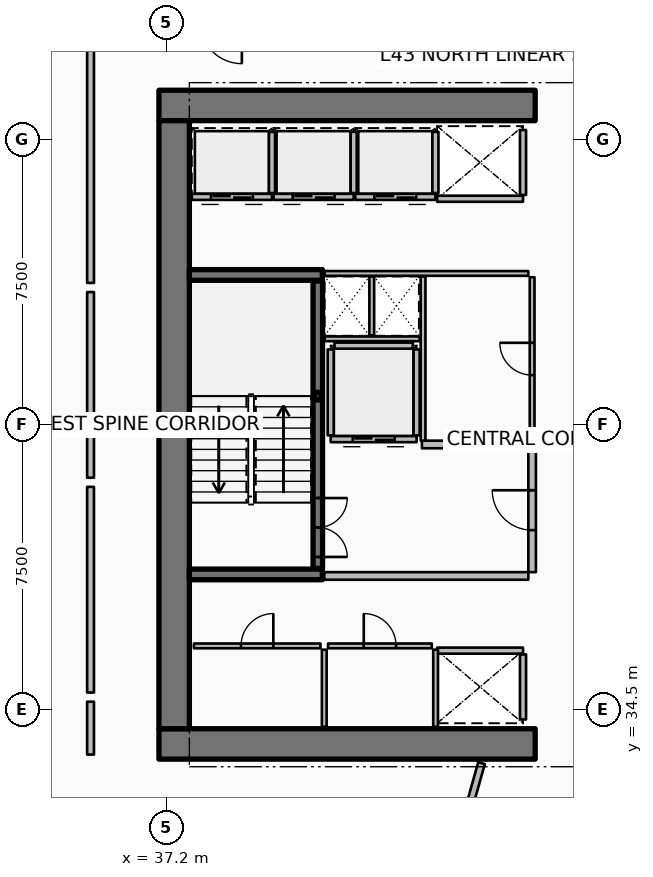
"""IFC4 building model, lengths in metres.
Left out: names, types, materials, properties, quantities, classifications, styles, units other than length and angle.
Written with IfcOpenShell. Run it as: python <this file> out.ifc"""

import sys

from ifc_helpers import new_model, si_unit, direction, frame, frame_2d, origin, origin_2d, place, context, subcontext, project, spatial, rectangle, hollow_rectangle, extrude, element, fill, save


model = new_model("IFC4")
c1 = context("Model", 3, precision=1e-05, world=origin(), true_north=direction((0.0, 1.0)))
c2 = subcontext(c1, "Body", "Model", "MODEL_VIEW")
j1 = project(units=[si_unit("LENGTHUNIT", "METRE"), si_unit("PLANEANGLEUNIT", "RADIAN")], contexts=[c1])
p1 = place(None, origin())
s1 = spatial("IfcSite", under=j1, at=p1, CompositionType="ELEMENT")
p2 = place(p1, origin())
s2 = spatial("IfcBuilding", under=s1, at=p2, CompositionType="ELEMENT")
p3 = place(p2, frame((0.0, 0.0, 172.8)))
s3 = spatial("IfcBuildingStorey", under=s2, at=p3, CompositionType="ELEMENT", Elevation=172.8)
for number, where, z_axis, x_axis in (
    (1, (37.0, 33.6, 0.0), (0.0, 0.0, 1.0), (1.0, 0.0, 0.0)),
    (2, (37.0, 50.4, 0.0), (0.0, 0.0, 1.0), (1.0, 0.0, 0.0)),
):
    element("IfcWall", number, at=place(p3, frame(where, z_axis=z_axis, x_axis=x_axis)), inside=s3, PredefinedType="SHEAR", context=c2, shape_type="SweptSolid", body=[
        extrude(rectangle(XDim=9.9, YDim=0.8, at=frame_2d((4.95, 0.0))), origin(), (0.0, 0.0, 1.0), 3.75),
    ])
p4 = place(p3, frame((37.4, 34.0, 0.0), z_axis=(0.0, 0.0, 1.0), x_axis=(0.0, 1.0, 0.0)))
e3 = element("IfcWall", 3, at=p4, inside=s3, PredefinedType="SHEAR", context=c2, shape_type="SweptSolid", body=[
    extrude(rectangle(XDim=16.0, YDim=0.8, at=frame_2d((8.0, 0.0))), origin(), (0.0, 0.0, 1.0), 3.75),
])
for number, where, z_axis, x_axis in (
    (4, (37.8, 38.06, 0.0), (0.0, 0.0, 1.0), (1.0, 0.0, 0.0)),
    (5, (37.8, 45.94, 0.0), (0.0, 0.0, 1.0), (1.0, 0.0, 0.0)),
):
    element("IfcWall", number, at=place(p3, frame(where, z_axis=z_axis, x_axis=x_axis)), inside=s3, PredefinedType="SHEAR", context=c2, shape_type="SweptSolid", body=[
        extrude(rectangle(XDim=3.5, YDim=0.28, at=frame_2d((1.75, 0.0))), origin(), (0.0, 0.0, 1.0), 3.75),
    ])
p5 = place(p3, frame((41.18, 42.75, 0.0), z_axis=(0.0, 0.0, 1.0), x_axis=(1.0, 0.0, 0.0)))
e6 = element("IfcColumn", 6, at=p5, inside=s3, PredefinedType="COLUMN", context=c2, shape_type="SweptSolid", body=[
    extrude(hollow_rectangle(XDim=0.2, YDim=0.2, WallThickness=0.01, InnerFilletRadius=0.01, OuterFilletRadius=0.02, at=origin_2d()), origin(), (0.0, 0.0, 1.0), 1.67),
])
p6 = place(p3, frame((41.18, 38.22, 0.0), z_axis=(0.0, 0.0, 1.0), x_axis=(0.0, 1.0, 0.0)))
e7 = element("IfcWall", 7, at=p6, inside=s3, PredefinedType="SOLIDWALL", context=c2, shape_type="SweptSolid", body=[
    extrude(rectangle(XDim=7.56, YDim=0.25, at=frame_2d((3.78, 0.0))), origin(), (0.0, 0.0, 1.0), 3.35),
])
p7 = place(p6, frame((0.3, 0.0, 0.0)))
e8 = element("IfcOpeningElement", 8, at=p7, cuts=e7, PredefinedType="OPENING", context=c2, shape_type="SweptSolid", body=[
    extrude(rectangle(XDim=1.55, YDim=2.15, at=frame_2d((0.775, 1.075))), frame((0.0, 0.135, 0.0), z_axis=(0.0, -1.0, 0.0), x_axis=(1.0, 0.0, 0.0)), (0.0, 0.0, 1.0), 0.27),
])
p8 = place(p3, frame((39.975, 47.995, 0.0), z_axis=(0.0, 0.0, 1.0), x_axis=(-1.0, 0.0, 0.0)))
e9 = element("IfcWall", 9, at=p8, inside=s3, PredefinedType="PARTITIONING", context=c2, shape_type="SweptSolid", body=[
    extrude(rectangle(XDim=2.11, YDim=0.16, at=frame_2d((1.055, 0.0))), origin(), (0.0, 0.0, 1.0), 3.35),
])
p9 = place(p8, frame((0.505, 0.0, 0.0)))
e10 = element("IfcOpeningElement", 10, at=p9, cuts=e9, PredefinedType="OPENING", context=c2, shape_type="SweptSolid", body=[
    extrude(rectangle(XDim=1.1, YDim=2.1, at=frame_2d((0.55, 1.05))), frame((0.0, 0.09, 0.0), z_axis=(0.0, -1.0, 0.0), x_axis=(1.0, 0.0, 0.0)), (0.0, 0.0, 1.0), 0.18),
])
p10 = place(p3, frame((39.975, 48.095, 0.0), z_axis=(0.0, 0.0, 1.0), x_axis=(0.0, 1.0, 0.0)))
e11 = element("IfcWall", 11, at=p10, inside=s3, PredefinedType="PARTITIONING", context=c2, shape_type="SweptSolid", body=[
    extrude(rectangle(XDim=1.61, YDim=0.16, at=frame_2d((0.805, 0.0))), origin(), (0.0, 0.0, 1.0), 3.35),
])
p11 = place(p3, frame((42.125, 47.995, 0.0), z_axis=(0.0, 0.0, 1.0), x_axis=(-1.0, 0.0, 0.0)))
e12 = element("IfcWall", 12, at=p11, inside=s3, PredefinedType="PARTITIONING", context=c2, shape_type="SweptSolid", body=[
    extrude(rectangle(XDim=2.11, YDim=0.16, at=frame_2d((1.055, 0.0))), origin(), (0.0, 0.0, 1.0), 3.35),
])
p12 = place(p11, frame((0.505, 0.0, 0.0)))
e13 = element("IfcOpeningElement", 13, at=p12, cuts=e12, PredefinedType="OPENING", context=c2, shape_type="SweptSolid", body=[
    extrude(rectangle(XDim=1.1, YDim=2.1, at=frame_2d((0.55, 1.05))), frame((0.0, 0.09, 0.0), z_axis=(0.0, -1.0, 0.0), x_axis=(1.0, 0.0, 0.0)), (0.0, 0.0, 1.0), 0.18),
])
p13 = place(p3, frame((42.125, 48.095, 0.0), z_axis=(0.0, 0.0, 1.0), x_axis=(0.0, 1.0, 0.0)))
e14 = element("IfcWall", 14, at=p13, inside=s3, PredefinedType="PARTITIONING", context=c2, shape_type="SweptSolid", body=[
    extrude(rectangle(XDim=1.61, YDim=0.16, at=frame_2d((0.805, 0.0))), origin(), (0.0, 0.0, 1.0), 3.35),
])
p14 = place(p3, frame((44.275, 47.995, 0.0), z_axis=(0.0, 0.0, 1.0), x_axis=(-1.0, 0.0, 0.0)))
e15 = element("IfcWall", 15, at=p14, inside=s3, PredefinedType="PARTITIONING", context=c2, shape_type="SweptSolid", body=[
    extrude(rectangle(XDim=2.11, YDim=0.16, at=frame_2d((1.055, 0.0))), origin(), (0.0, 0.0, 1.0), 3.35),
])
p15 = place(p14, frame((0.505, 0.0, 0.0)))
e16 = element("IfcOpeningElement", 16, at=p15, cuts=e15, PredefinedType="OPENING", context=c2, shape_type="SweptSolid", body=[
    extrude(rectangle(XDim=1.1, YDim=2.1, at=frame_2d((0.55, 1.05))), frame((0.0, 0.09, 0.0), z_axis=(0.0, -1.0, 0.0), x_axis=(1.0, 0.0, 0.0)), (0.0, 0.0, 1.0), 0.18),
])
p16 = place(p3, frame((44.275, 48.095, 0.0), z_axis=(0.0, 0.0, 1.0), x_axis=(0.0, 1.0, 0.0)))
e17 = element("IfcWall", 17, at=p16, inside=s3, PredefinedType="PARTITIONING", context=c2, shape_type="SweptSolid", body=[
    extrude(rectangle(XDim=1.61, YDim=0.16, at=frame_2d((0.805, 0.0))), origin(), (0.0, 0.0, 1.0), 3.35),
])
p17 = place(p3, frame((46.58, 47.945, 0.0), z_axis=(0.0, 0.0, 1.0), x_axis=(-1.0, 0.0, 0.0)))
e18 = element("IfcWall", 18, at=p17, inside=s3, PredefinedType="PARTITIONING", context=c2, shape_type="SweptSolid", body=[
    extrude(rectangle(XDim=2.26, YDim=0.16, at=frame_2d((1.13, 0.0))), origin(), (0.0, 0.0, 1.0), 3.35),
])
p18 = place(p3, frame((46.58, 48.045, 0.0), z_axis=(0.0, 0.0, 1.0), x_axis=(0.0, 1.0, 0.0)))
e19 = element("IfcWall", 19, at=p18, inside=s3, PredefinedType="PARTITIONING", context=c2, shape_type="SweptSolid", body=[
    extrude(rectangle(XDim=1.71, YDim=0.16, at=frame_2d((0.855, 0.0))), origin(), (0.0, 0.0, 1.0), 3.35),
])
p19 = place(p3, frame((44.32, 36.055, 0.0), z_axis=(0.0, 0.0, 1.0), x_axis=(1.0, 0.0, 0.0)))
e20 = element("IfcWall", 20, at=p19, inside=s3, PredefinedType="PARTITIONING", context=c2, shape_type="SweptSolid", body=[
    extrude(rectangle(XDim=2.26, YDim=0.16, at=frame_2d((1.13, 0.0))), origin(), (0.0, 0.0, 1.0), 3.35),
])
p20 = place(p3, frame((46.58, 34.245, 0.0), z_axis=(0.0, 0.0, 1.0), x_axis=(0.0, 1.0, 0.0)))
e21 = element("IfcWall", 21, at=p20, inside=s3, PredefinedType="PARTITIONING", context=c2, shape_type="SweptSolid", body=[
    extrude(rectangle(XDim=1.71, YDim=0.16, at=frame_2d((0.855, 0.0))), origin(), (0.0, 0.0, 1.0), 3.35),
])
p21 = place(p3, frame((43.78, 41.62, 0.0), z_axis=(0.0, 0.0, 1.0), x_axis=(-1.0, 0.0, 0.0)))
e22 = element("IfcWall", 22, at=p21, inside=s3, PredefinedType="PARTITIONING", context=c2, shape_type="SweptSolid", body=[
    extrude(rectangle(XDim=2.26, YDim=0.16, at=frame_2d((1.13, 0.0))), origin(), (0.0, 0.0, 1.0), 3.35),
])
p22 = place(p21, frame((0.58, 0.0, 0.0)))
e23 = element("IfcOpeningElement", 23, at=p22, cuts=e22, PredefinedType="OPENING", context=c2, shape_type="SweptSolid", body=[
    extrude(rectangle(XDim=1.1, YDim=2.1, at=frame_2d((0.55, 1.05))), frame((0.0, 0.09, 0.0), z_axis=(0.0, -1.0, 0.0), x_axis=(1.0, 0.0, 0.0)), (0.0, 0.0, 1.0), 0.18),
])
for number, where, z_axis, x_axis in (
    (24, (43.78, 41.72, 0.0), (0.0, 0.0, 1.0), (0.0, 1.0, 0.0)),
    (25, (41.52, 41.72, 0.0), (0.0, 0.0, 1.0), (0.0, 1.0, 0.0)),
):
    element("IfcWall", number, at=place(p3, frame(where, z_axis=z_axis, x_axis=x_axis)), inside=s3, PredefinedType="PARTITIONING", context=c2, shape_type="SweptSolid", body=[
        extrude(rectangle(XDim=2.26, YDim=0.16, at=frame_2d((1.13, 0.0))), origin(), (0.0, 0.0, 1.0), 3.35),
    ])
p23 = place(p3, frame((41.62, 44.08, 0.0), z_axis=(0.0, 0.0, 1.0), x_axis=(1.0, 0.0, 0.0)))
e26 = element("IfcWall", 26, at=p23, inside=s3, PredefinedType="PARTITIONING", context=c2, shape_type="SweptSolid", body=[
    extrude(rectangle(XDim=2.06, YDim=0.16, at=frame_2d((1.03, 0.0))), origin(), (0.0, 0.0, 1.0), 3.35),
])
for number, where, z_axis, x_axis in (
    (27, (44.28, 34.05, 0.0), (0.0, 0.0, 1.0), (0.0, 1.0, 0.0)),
    (28, (41.35, 34.05, 0.0), (0.0, 0.0, 1.0), (0.0, 1.0, 0.0)),
):
    element("IfcWall", number, at=place(p3, frame(where, z_axis=z_axis, x_axis=x_axis)), inside=s3, PredefinedType="PARTITIONING", context=c2, shape_type="SweptSolid", body=[
        extrude(rectangle(XDim=2.03, YDim=0.125, at=frame_2d((1.015, 0.0))), origin(), (0.0, 0.0, 1.0), 2.79),
    ])
p24 = place(p3, frame((37.92, 36.18, 0.0), z_axis=(0.0, 0.0, 1.0), x_axis=(1.0, 0.0, 0.0)))
e29 = element("IfcWall", 29, at=p24, inside=s3, PredefinedType="PARTITIONING", context=c2, shape_type="SweptSolid", body=[
    extrude(rectangle(XDim=3.33, YDim=0.125, at=frame_2d((1.665, 0.0))), origin(), (0.0, 0.0, 1.0), 2.79),
])
p25 = place(p24, frame((1.24, 0.0, 0.0)))
e30 = element("IfcOpeningElement", 30, at=p25, cuts=e29, PredefinedType="OPENING", context=c2, shape_type="SweptSolid", body=[
    extrude(rectangle(XDim=0.85, YDim=2.06, at=frame_2d((0.425, 1.03))), frame((0.0, 0.073, 0.0), z_axis=(0.0, -1.0, 0.0), x_axis=(1.0, 0.0, 0.0)), (0.0, 0.0, 1.0), 0.145),
])
p26 = place(p3, frame((41.45, 36.18, 0.0), z_axis=(0.0, 0.0, 1.0), x_axis=(1.0, 0.0, 0.0)))
e31 = element("IfcWall", 31, at=p26, inside=s3, PredefinedType="PARTITIONING", context=c2, shape_type="SweptSolid", body=[
    extrude(rectangle(XDim=2.73, YDim=0.125, at=frame_2d((1.365, 0.0))), origin(), (0.0, 0.0, 1.0), 2.79),
])
p27 = place(p26, frame((0.94, 0.0, 0.0)))
e32 = element("IfcOpeningElement", 32, at=p27, cuts=e31, PredefinedType="OPENING", context=c2, shape_type="SweptSolid", body=[
    extrude(rectangle(XDim=0.85, YDim=2.06, at=frame_2d((0.425, 1.03))), frame((0.0, 0.073, 0.0), z_axis=(0.0, -1.0, 0.0), x_axis=(1.0, 0.0, 0.0)), (0.0, 0.0, 1.0), 0.145),
])
p28 = place(p3, frame((41.35, 38.02, 0.0), z_axis=(0.0, 0.0, 1.0), x_axis=(1.0, 0.0, 0.0)))
e33 = element("IfcWall", 33, at=p28, inside=s3, PredefinedType="PARTITIONING", context=c2, shape_type="SweptSolid", body=[
    extrude(rectangle(XDim=5.37, YDim=0.2, at=frame_2d((2.685, 0.0))), origin(), (0.0, 0.0, 1.0), 3.35),
])
p29 = place(p3, frame((43.92, 41.48, 0.0), z_axis=(0.0, 0.0, 1.0), x_axis=(1.0, 0.0, 0.0)))
e34 = element("IfcWall", 34, at=p29, inside=s3, PredefinedType="PARTITIONING", context=c2, shape_type="SweptSolid", body=[
    extrude(rectangle(XDim=2.8, YDim=0.2, at=frame_2d((1.4, 0.0))), origin(), (0.0, 0.0, 1.0), 3.35),
])
p30 = place(p3, frame((46.82, 38.12, 0.0), z_axis=(0.0, 0.0, 1.0), x_axis=(0.0, 1.0, 0.0)))
e35 = element("IfcWall", 35, at=p30, inside=s3, PredefinedType="PARTITIONING", context=c2, shape_type="SweptSolid", body=[
    extrude(rectangle(XDim=3.26, YDim=0.2, at=frame_2d((1.63, 0.0))), origin(), (0.0, 0.0, 1.0), 3.35),
])
p31 = place(p30, frame((1.105, 0.0, 0.0)))
e36 = element("IfcOpeningElement", 36, at=p31, cuts=e35, PredefinedType="OPENING", context=c2, shape_type="SweptSolid", body=[
    extrude(rectangle(XDim=1.05, YDim=2.1, at=frame_2d((0.525, 1.05))), frame((0.0, 0.11, 0.0), z_axis=(0.0, -1.0, 0.0), x_axis=(1.0, 0.0, 0.0)), (0.0, 0.0, 1.0), 0.22),
])
p32 = place(p3, frame((41.36, 45.98, 0.0), z_axis=(0.0, 0.0, 1.0), x_axis=(1.0, 0.0, 0.0)))
e37 = element("IfcWall", 37, at=p32, inside=s3, PredefinedType="PARTITIONING", context=c2, shape_type="SweptSolid", body=[
    extrude(rectangle(XDim=5.36, YDim=0.125, at=frame_2d((2.68, 0.0))), origin(), (0.0, 0.0, 1.0), 2.79),
])
p33 = place(p3, frame((41.36, 44.26, 0.0), z_axis=(0.0, 0.0, 1.0), x_axis=(1.0, 0.0, 0.0)))
e38 = element("IfcWall", 38, at=p33, inside=s3, PredefinedType="PARTITIONING", context=c2, shape_type="SweptSolid", body=[
    extrude(rectangle(XDim=2.5, YDim=0.125, at=frame_2d((1.25, 0.0))), origin(), (0.0, 0.0, 1.0), 2.79),
])
p34 = place(p3, frame((42.6, 44.35, 0.0), z_axis=(0.0, 0.0, 1.0), x_axis=(0.0, 1.0, 0.0)))
e39 = element("IfcWall", 39, at=p34, inside=s3, PredefinedType="PARTITIONING", context=c2, shape_type="SweptSolid", body=[
    extrude(rectangle(XDim=1.55, YDim=0.125, at=frame_2d((0.775, 0.0))), origin(), (0.0, 0.0, 1.0), 2.79),
])
p35 = place(p3, frame((43.95, 41.58, 0.0), z_axis=(0.0, 0.0, 1.0), x_axis=(0.0, 1.0, 0.0)))
e40 = element("IfcWall", 40, at=p35, inside=s3, PredefinedType="PARTITIONING", context=c2, shape_type="SweptSolid", body=[
    extrude(rectangle(XDim=4.32, YDim=0.125, at=frame_2d((2.16, 0.0))), origin(), (0.0, 0.0, 1.0), 2.79),
])
p36 = place(p3, frame((46.82, 41.58, 0.0), z_axis=(0.0, 0.0, 1.0), x_axis=(0.0, 1.0, 0.0)))
e41 = element("IfcWall", 41, at=p36, inside=s3, PredefinedType="PARTITIONING", context=c2, shape_type="SweptSolid", body=[
    extrude(rectangle(XDim=4.3, YDim=0.125, at=frame_2d((2.15, 0.0))), origin(), (0.0, 0.0, 1.0), 2.79),
])
p37 = place(p36, frame((1.725, 0.0, 0.0)))
e42 = element("IfcOpeningElement", 42, at=p37, cuts=e41, PredefinedType="OPENING", context=c2, shape_type="SweptSolid", body=[
    extrude(rectangle(XDim=0.85, YDim=2.06, at=frame_2d((0.425, 1.03))), frame((0.0, 0.073, 0.0), z_axis=(0.0, -1.0, 0.0), x_axis=(1.0, 0.0, 0.0)), (0.0, 0.0, 1.0), 0.145),
])
p38 = place(p3, frame((45.488, 33.094, 0.0), z_axis=(0.0, 0.0, 1.0), x_axis=(-0.271442952208, -0.962454530717, 0.0)))
e43 = element("IfcWall", 43, at=p38, inside=s3, PredefinedType="PARTITIONING", context=c2, shape_type="SweptSolid", body=[
    extrude(rectangle(XDim=14.486, YDim=0.18, at=frame_2d((7.243, 0.0))), origin(), (0.0, 0.0, 1.0), 2.307),
])
p39 = place(p3, frame((35.2, 51.971, 0.0), z_axis=(0.0, 0.0, 1.0), x_axis=(0.0, -1.0, 0.0)))
e44 = element("IfcWall", 44, at=p39, inside=s3, PredefinedType="PARTITIONING", context=c2, shape_type="SweptSolid", body=[
    extrude(rectangle(XDim=6.241, YDim=0.18, at=frame_2d((3.12, 0.0))), origin(), (0.0, 0.0, 1.0), 2.307),
])
p40 = place(p3, frame((35.2, 45.49, 0.0), z_axis=(0.0, 0.0, 1.0), x_axis=(0.0, -1.0, 0.0)))
e45 = element("IfcWall", 45, at=p40, inside=s3, PredefinedType="PARTITIONING", context=c2, shape_type="SweptSolid", body=[
    extrude(rectangle(XDim=4.885, YDim=0.18, at=frame_2d((2.442, 0.0))), origin(), (0.0, 0.0, 1.0), 2.307),
])
p41 = place(p3, frame((35.2, 40.365, 0.0), z_axis=(0.0, 0.0, 1.0), x_axis=(0.0, -1.0, 0.0)))
e46 = element("IfcWall", 46, at=p41, inside=s3, PredefinedType="PARTITIONING", context=c2, shape_type="SweptSolid", body=[
    extrude(rectangle(XDim=5.413, YDim=0.18, at=frame_2d((2.707, 0.0))), origin(), (0.0, 0.0, 1.0), 2.307),
])
p42 = place(p3, frame((35.2, 34.712, 0.0), z_axis=(0.0, 0.0, 1.0), x_axis=(0.0, -1.0, 0.0)))
e47 = element("IfcWall", 47, at=p42, inside=s3, PredefinedType="PARTITIONING", context=c2, shape_type="SweptSolid", body=[
    extrude(rectangle(XDim=1.392, YDim=0.18, at=frame_2d((0.696, 0.0))), origin(), (0.0, 0.0, 1.0), 2.307),
])
p43 = place(p3, frame((31.983, 32.907, 0.0), z_axis=(0.0, 0.0, 1.0), x_axis=(0.649447060425, -0.76040680935, 0.0)))
e48 = element("IfcWall", 48, at=p43, inside=s3, PredefinedType="PARTITIONING", context=c2, shape_type="SweptSolid", body=[
    extrude(rectangle(XDim=6.975, YDim=0.125, at=frame_2d((3.487, 0.0))), origin(), (0.0, 0.0, 1.0), 2.307),
])
p44 = place(p43, frame((3.037, 0.0, 0.0)))
e49 = element("IfcOpeningElement", 49, at=p44, cuts=e48, PredefinedType="OPENING", context=c2, shape_type="SweptSolid", body=[
    extrude(rectangle(XDim=0.9, YDim=2.08, at=frame_2d((0.45, 1.04))), frame((0.0, 0.073, 0.0), z_axis=(0.0, -1.0, 0.0), x_axis=(1.0, 0.0, 0.0)), (0.0, 0.0, 1.0), 0.145),
])
p45 = place(p7, origin())
e50 = element("IfcDoor", 50, at=p45, inside=s3, OperationType="DOUBLE_DOOR_SINGLE_SWING", PredefinedType="DOOR", context=c2, shape_type="SweptSolid", body=[
    extrude(rectangle(XDim=1.55, YDim=2.15, at=frame_2d((0.775, 1.075))), frame((0.0, 0.025, 0.0), z_axis=(0.0, -1.0, 0.0), x_axis=(1.0, 0.0, 0.0)), (0.0, 0.0, 1.0), 0.05),
])
fill(e8, e50)
p46 = place(p9, origin())
e51 = element("IfcDoor", 51, at=p46, inside=s3, OperationType="DOUBLE_DOOR_SLIDING", PredefinedType="DOOR", context=c2, shape_type="SweptSolid", body=[
    extrude(rectangle(XDim=1.1, YDim=2.1, at=frame_2d((0.55, 1.05))), frame((0.0, 0.025, 0.0), z_axis=(0.0, -1.0, 0.0), x_axis=(1.0, 0.0, 0.0)), (0.0, 0.0, 1.0), 0.05),
])
fill(e10, e51)
p47 = place(p12, origin())
e52 = element("IfcDoor", 52, at=p47, inside=s3, OperationType="DOUBLE_DOOR_SLIDING", PredefinedType="DOOR", context=c2, shape_type="SweptSolid", body=[
    extrude(rectangle(XDim=1.1, YDim=2.1, at=frame_2d((0.55, 1.05))), frame((0.0, 0.025, 0.0), z_axis=(0.0, -1.0, 0.0), x_axis=(1.0, 0.0, 0.0)), (0.0, 0.0, 1.0), 0.05),
])
fill(e13, e52)
p48 = place(p15, origin())
e53 = element("IfcDoor", 53, at=p48, inside=s3, OperationType="DOUBLE_DOOR_SLIDING", PredefinedType="DOOR", context=c2, shape_type="SweptSolid", body=[
    extrude(rectangle(XDim=1.1, YDim=2.1, at=frame_2d((0.55, 1.05))), frame((0.0, 0.025, 0.0), z_axis=(0.0, -1.0, 0.0), x_axis=(1.0, 0.0, 0.0)), (0.0, 0.0, 1.0), 0.05),
])
fill(e16, e53)
p49 = place(p22, origin())
e54 = element("IfcDoor", 54, at=p49, inside=s3, OperationType="DOUBLE_DOOR_SLIDING", PredefinedType="DOOR", context=c2, shape_type="SweptSolid", body=[
    extrude(rectangle(XDim=1.1, YDim=2.1, at=frame_2d((0.55, 1.05))), frame((0.0, 0.025, 0.0), z_axis=(0.0, -1.0, 0.0), x_axis=(1.0, 0.0, 0.0)), (0.0, 0.0, 1.0), 0.05),
])
fill(e23, e54)
p50 = place(p25, origin())
e55 = element("IfcDoor", 55, at=p50, inside=s3, OperationType="SINGLE_SWING_RIGHT", PredefinedType="DOOR", context=c2, shape_type="SweptSolid", body=[
    extrude(rectangle(XDim=0.85, YDim=2.06, at=frame_2d((0.425, 1.03))), frame((0.0, 0.025, 0.0), z_axis=(0.0, -1.0, 0.0), x_axis=(1.0, 0.0, 0.0)), (0.0, 0.0, 1.0), 0.05),
])
fill(e30, e55)
p51 = place(p27, origin())
e56 = element("IfcDoor", 56, at=p51, inside=s3, OperationType="SINGLE_SWING_LEFT", PredefinedType="DOOR", context=c2, shape_type="SweptSolid", body=[
    extrude(rectangle(XDim=0.85, YDim=2.06, at=frame_2d((0.425, 1.03))), frame((0.0, 0.025, 0.0), z_axis=(0.0, -1.0, 0.0), x_axis=(1.0, 0.0, 0.0)), (0.0, 0.0, 1.0), 0.05),
])
fill(e32, e56)
p52 = place(p31, origin())
e57 = element("IfcDoor", 57, at=p52, inside=s3, OperationType="SINGLE_SWING_RIGHT", PredefinedType="DOOR", context=c2, shape_type="SweptSolid", body=[
    extrude(rectangle(XDim=1.05, YDim=2.1, at=frame_2d((0.525, 1.05))), frame((0.0, 0.025, 0.0), z_axis=(0.0, -1.0, 0.0), x_axis=(1.0, 0.0, 0.0)), (0.0, 0.0, 1.0), 0.05),
])
fill(e36, e57)
p53 = place(p37, origin())
e58 = element("IfcDoor", 58, at=p53, inside=s3, OperationType="SINGLE_SWING_RIGHT", PredefinedType="DOOR", context=c2, shape_type="SweptSolid", body=[
    extrude(rectangle(XDim=0.85, YDim=2.06, at=frame_2d((0.425, 1.03))), frame((0.0, 0.025, 0.0), z_axis=(0.0, -1.0, 0.0), x_axis=(1.0, 0.0, 0.0)), (0.0, 0.0, 1.0), 0.05),
])
fill(e42, e58)
save(model, sys.argv[1])
